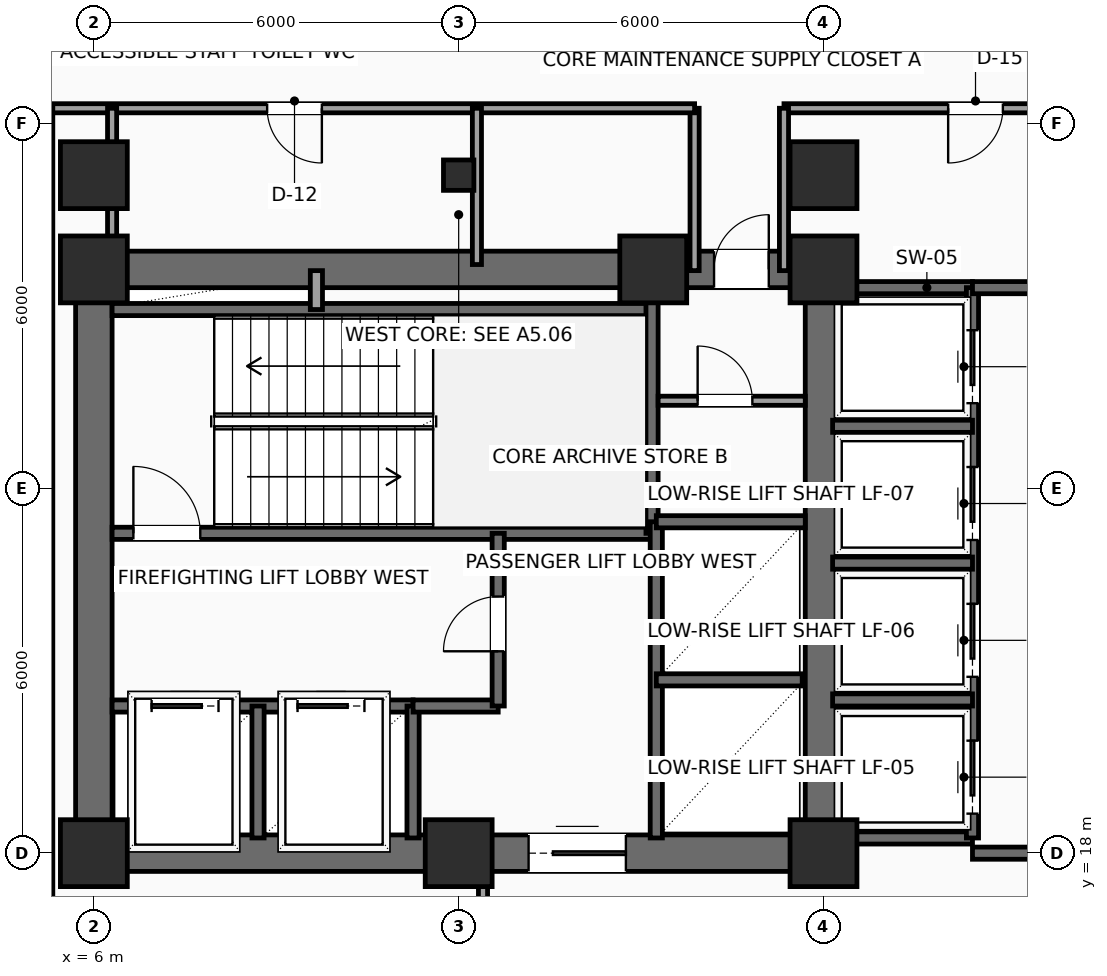
"""IFC4 building model, lengths in metres.
Left out: names, types, materials, properties, quantities, classifications, styles, units other than length and angle.
Written with IfcOpenShell. Run it as: python <this file> out.ifc"""

import sys

from ifc_helpers import new_model, si_unit, direction, frame, frame_2d, origin, origin_2d, place, context, subcontext, project, spatial, rectangle, hollow_rectangle, extrude, element, fill, save


model = new_model("IFC4")
c1 = context("Model", 3, precision=1e-05, world=origin(), true_north=direction((0.0, 1.0)))
c2 = subcontext(c1, "Body", "Model", "MODEL_VIEW")
j1 = project(units=[si_unit("LENGTHUNIT", "METRE"), si_unit("PLANEANGLEUNIT", "RADIAN")], contexts=[c1])
p1 = place(None, origin())
s1 = spatial("IfcSite", under=j1, at=p1, CompositionType="ELEMENT")
p2 = place(p1, origin())
s2 = spatial("IfcBuilding", under=s1, at=p2, CompositionType="ELEMENT")
p3 = place(p2, frame((0.0, 0.0, 99.6)))
s3 = spatial("IfcBuildingStorey", under=s2, at=p3, CompositionType="ELEMENT", Elevation=99.6)
for number, where, z_axis, x_axis in (
    (1, (6.0, 18.0, 0.0), (0.0, 0.0, 1.0), (1.0, 0.0, 0.0)),
    (2, (12.0, 18.0, 0.0), (0.0, 0.0, 1.0), (1.0, 0.0, 0.0)),
    (3, (18.0, 18.0, 0.0), (0.0, 0.0, 1.0), (1.0, 0.0, 0.0)),
    (4, (6.0, 27.6, 0.0), (0.0, 0.0, 1.0), (1.0, 0.0, 0.0)),
    (5, (15.2, 27.6, 0.0), (0.0, 0.0, 1.0), (1.0, 0.0, 0.0)),
    (6, (18.0, 27.6, 0.0), (0.0, 0.0, 1.0), (1.0, 0.0, 0.0)),
    (7, (6.0, 29.15, 0.0), (0.0, 0.0, 1.0), (1.0, 0.0, 0.0)),
):
    element("IfcColumn", number, at=place(p3, frame(where, z_axis=z_axis, x_axis=x_axis)), inside=s3, PredefinedType="COLUMN", context=c2, shape_type="SweptSolid", body=[
        extrude(rectangle(XDim=1.1, YDim=1.1, at=origin_2d()), origin(), (0.0, 0.0, 1.0), 3.75),
    ])
p4 = place(p3, frame((12.0, 29.15, 0.0), z_axis=(0.0, 0.0, 1.0), x_axis=(1.0, 0.0, 0.0)))
e8 = element("IfcColumn", 8, at=p4, inside=s3, PredefinedType="COLUMN", context=c2, shape_type="SweptSolid", body=[
    extrude(hollow_rectangle(XDim=0.5, YDim=0.5, WallThickness=0.025, InnerFilletRadius=0.025, OuterFilletRadius=0.04, at=origin_2d()), origin(), (0.0, 0.0, 1.0), 3.75),
])
p5 = place(p3, frame((18.0, 29.15, 0.0), z_axis=(0.0, 0.0, 1.0), x_axis=(1.0, 0.0, 0.0)))
e9 = element("IfcColumn", 9, at=p5, inside=s3, PredefinedType="COLUMN", context=c2, shape_type="SweptSolid", body=[
    extrude(rectangle(XDim=1.1, YDim=1.1, at=origin_2d()), origin(), (0.0, 0.0, 1.0), 3.75),
])
p6 = place(p3, frame((6.0, 18.0, 0.0), z_axis=(0.0, 0.0, 1.0), x_axis=(1.0, 0.0, 0.0)))
e10 = element("IfcWall", 10, at=p6, inside=s3, PredefinedType="SHEAR", context=c2, shape_type="SweptSolid", body=[
    extrude(rectangle(XDim=12.0, YDim=0.6, at=frame_2d((6.0, 0.0))), origin(), (0.0, 0.0, 1.0), 3.525),
])
p7 = place(p6, frame((7.15, 0.0, 0.0)))
e11 = element("IfcOpeningElement", 11, at=p7, cuts=e10, PredefinedType="OPENING", context=c2, shape_type="SweptSolid", body=[
    extrude(rectangle(XDim=1.6, YDim=2.3, at=frame_2d((0.8, 1.15))), frame((0.0, 0.31, 0.0), z_axis=(0.0, -1.0, 0.0), x_axis=(1.0, 0.0, 0.0)), (0.0, 0.0, 1.0), 0.62),
])
p8 = place(p3, frame((6.0, 27.6, 0.0), z_axis=(0.0, 0.0, 1.0), x_axis=(1.0, 0.0, 0.0)))
e12 = element("IfcWall", 12, at=p8, inside=s3, PredefinedType="SHEAR", context=c2, shape_type="SweptSolid", body=[
    extrude(rectangle(XDim=12.0, YDim=0.6, at=frame_2d((6.0, 0.0))), origin(), (0.0, 0.0, 1.0), 3.525),
])
p9 = place(p8, frame((10.2, 0.0, 0.0)))
e13 = element("IfcOpeningElement", 13, at=p9, cuts=e12, PredefinedType="OPENING", context=c2, shape_type="SweptSolid", body=[
    extrude(rectangle(XDim=0.9, YDim=2.15, at=frame_2d((0.45, 1.075))), frame((0.0, 0.31, 0.0), z_axis=(0.0, -1.0, 0.0), x_axis=(1.0, 0.0, 0.0)), (0.0, 0.0, 1.0), 0.62),
])
for number, where, z_axis, x_axis in (
    (14, (6.0, 18.0, 0.0), (0.0, 0.0, 1.0), (0.0, 1.0, 0.0)),
    (15, (18.0, 18.0, 0.0), (0.0, 0.0, 1.0), (0.0, 1.0, 0.0)),
):
    element("IfcWall", number, at=place(p3, frame(where, z_axis=z_axis, x_axis=x_axis)), inside=s3, PredefinedType="SHEAR", context=c2, shape_type="SweptSolid", body=[
        extrude(rectangle(XDim=9.6, YDim=0.6, at=frame_2d((4.8, 0.0))), origin(), (0.0, 0.0, 1.0), 3.525),
    ])
p10 = place(p3, frame((6.3, 23.26, 0.0), z_axis=(0.0, 0.0, 1.0), x_axis=(1.0, 0.0, 0.0)))
e16 = element("IfcWall", 16, at=p10, inside=s3, PredefinedType="SHEAR", context=c2, shape_type="SweptSolid", body=[
    extrude(rectangle(XDim=8.88, YDim=0.2, at=frame_2d((4.44, 0.0))), origin(), (0.0, 0.0, 1.0), 3.525),
])
p11 = place(p10, frame((0.35, 0.0, 0.0)))
e17 = element("IfcOpeningElement", 17, at=p11, cuts=e16, PredefinedType="OPENING", context=c2, shape_type="SweptSolid", body=[
    extrude(rectangle(XDim=1.1, YDim=2.2, at=frame_2d((0.55, 1.1))), frame((0.0, 0.11, 0.0), z_axis=(0.0, -1.0, 0.0), x_axis=(1.0, 0.0, 0.0)), (0.0, 0.0, 1.0), 0.22),
])
p12 = place(p3, frame((6.3, 26.94, 0.0), z_axis=(0.0, 0.0, 1.0), x_axis=(1.0, 0.0, 0.0)))
e18 = element("IfcWall", 18, at=p12, inside=s3, PredefinedType="SHEAR", context=c2, shape_type="SweptSolid", body=[
    extrude(rectangle(XDim=8.88, YDim=0.2, at=frame_2d((4.44, 0.0))), origin(), (0.0, 0.0, 1.0), 3.525),
])
p13 = place(p3, frame((15.18, 23.26, 0.0), z_axis=(0.0, 0.0, 1.0), x_axis=(0.0, 1.0, 0.0)))
e19 = element("IfcWall", 19, at=p13, inside=s3, PredefinedType="SHEAR", context=c2, shape_type="SweptSolid", body=[
    extrude(rectangle(XDim=4.04, YDim=0.2, at=frame_2d((2.02, 0.0))), origin(), (0.0, 0.0, 1.0), 3.525),
])
p14 = place(p3, frame((6.3, 20.42, 0.0), z_axis=(0.0, 0.0, 1.0), x_axis=(1.0, 0.0, 0.0)))
e20 = element("IfcWall", 20, at=p14, inside=s3, PredefinedType="SHEAR", context=c2, shape_type="SweptSolid", body=[
    extrude(rectangle(XDim=4.95, YDim=0.2, at=frame_2d((2.475, 0.0))), origin(), (0.0, 0.0, 1.0), 3.525),
])
p15 = place(p14, frame((0.65, 0.0, 0.0)))
e21 = element("IfcOpeningElement", 21, at=p15, cuts=e20, PredefinedType="OPENING", context=c2, shape_type="SweptSolid", body=[
    extrude(rectangle(XDim=1.1, YDim=2.2, at=frame_2d((0.55, 1.1))), frame((0.0, 0.11, 0.0), z_axis=(0.0, -1.0, 0.0), x_axis=(1.0, 0.0, 0.0)), (0.0, 0.0, 1.0), 0.22),
])
p16 = place(p14, frame((3.05, 0.0, 0.0)))
e22 = element("IfcOpeningElement", 22, at=p16, cuts=e20, PredefinedType="OPENING", context=c2, shape_type="SweptSolid", body=[
    extrude(rectangle(XDim=1.1, YDim=2.2, at=frame_2d((0.55, 1.1))), frame((0.0, 0.11, 0.0), z_axis=(0.0, -1.0, 0.0), x_axis=(1.0, 0.0, 0.0)), (0.0, 0.0, 1.0), 0.22),
])
for number, where, z_axis, x_axis in (
    (23, (8.7, 18.25, 0.0), (0.0, 0.0, 1.0), (0.0, 1.0, 0.0)),
    (24, (11.25, 18.25, 0.0), (0.0, 0.0, 1.0), (0.0, 1.0, 0.0)),
):
    element("IfcWall", number, at=place(p3, frame(where, z_axis=z_axis, x_axis=x_axis)), inside=s3, PredefinedType="SHEAR", context=c2, shape_type="SweptSolid", body=[
        extrude(rectangle(XDim=2.17, YDim=0.2, at=frame_2d((1.085, 0.0))), origin(), (0.0, 0.0, 1.0), 3.525),
    ])
p17 = place(p3, frame((11.25, 20.42, 0.0), z_axis=(0.0, 0.0, 1.0), x_axis=(1.0, 0.0, 0.0)))
e25 = element("IfcWall", 25, at=p17, inside=s3, PredefinedType="SHEAR", context=c2, shape_type="SweptSolid", body=[
    extrude(rectangle(XDim=1.4, YDim=0.2, at=frame_2d((0.7, 0.0))), origin(), (0.0, 0.0, 1.0), 3.525),
])
p18 = place(p3, frame((12.65, 20.42, 0.0), z_axis=(0.0, 0.0, 1.0), x_axis=(0.0, 1.0, 0.0)))
e26 = element("IfcWall", 26, at=p18, inside=s3, PredefinedType="SHEAR", context=c2, shape_type="SweptSolid", body=[
    extrude(rectangle(XDim=2.84, YDim=0.2, at=frame_2d((1.42, 0.0))), origin(), (0.0, 0.0, 1.0), 3.525),
])
p19 = place(p18, frame((0.9, 0.0, 0.0)))
e27 = element("IfcOpeningElement", 27, at=p19, cuts=e26, PredefinedType="OPENING", context=c2, shape_type="SweptSolid", body=[
    extrude(rectangle(XDim=0.9, YDim=2.15, at=frame_2d((0.45, 1.075))), frame((0.0, 0.11, 0.0), z_axis=(0.0, -1.0, 0.0), x_axis=(1.0, 0.0, 0.0)), (0.0, 0.0, 1.0), 0.22),
])
p20 = place(p3, frame((9.66, 26.94, 0.0), z_axis=(0.0, 0.0, 1.0), x_axis=(0.0, 1.0, 0.0)))
e28 = element("IfcWall", 28, at=p20, inside=s3, PredefinedType="SOLIDWALL", context=c2, shape_type="SweptSolid", body=[
    extrude(rectangle(XDim=0.64, YDim=0.2, at=frame_2d((0.32, 0.0))), origin(), (0.0, 0.0, 1.0), 3.525),
])
p21 = place(p3, frame((15.25, 18.25, 0.0), z_axis=(0.0, 0.0, 1.0), x_axis=(0.0, 1.0, 0.0)))
e29 = element("IfcWall", 29, at=p21, inside=s3, PredefinedType="SHEAR", context=c2, shape_type="SweptSolid", body=[
    extrude(rectangle(XDim=5.2, YDim=0.2, at=frame_2d((2.6, 0.0))), origin(), (0.0, 0.0, 1.0), 3.525),
])
p22 = place(p3, frame((15.25, 20.85, 0.0), z_axis=(0.0, 0.0, 1.0), x_axis=(1.0, 0.0, 0.0)))
e30 = element("IfcWall", 30, at=p22, inside=s3, PredefinedType="SHEAR", context=c2, shape_type="SweptSolid", body=[
    extrude(rectangle(XDim=2.4, YDim=0.2, at=frame_2d((1.2, 0.0))), origin(), (0.0, 0.0, 1.0), 3.525),
])
p23 = place(p3, frame((15.25, 23.45, 0.0), z_axis=(0.0, 0.0, 1.0), x_axis=(1.0, 0.0, 0.0)))
e31 = element("IfcWall", 31, at=p23, inside=s3, PredefinedType="SHEAR", context=c2, shape_type="SweptSolid", body=[
    extrude(rectangle(XDim=2.45, YDim=0.2, at=frame_2d((1.225, 0.0))), origin(), (0.0, 0.0, 1.0), 3.525),
])
p24 = place(p3, frame((15.28, 25.44, 0.0), z_axis=(0.0, 0.0, 1.0), x_axis=(1.0, 0.0, 0.0)))
e32 = element("IfcWall", 32, at=p24, inside=s3, PredefinedType="PARTITIONING", context=c2, shape_type="SweptSolid", body=[
    extrude(rectangle(XDim=2.42, YDim=0.15, at=frame_2d((1.21, 0.0))), origin(), (0.0, 0.0, 1.0), 3.525),
])
p25 = place(p24, frame((0.65, 0.0, 0.0)))
e33 = element("IfcOpeningElement", 33, at=p25, cuts=e32, PredefinedType="OPENING", context=c2, shape_type="SweptSolid", body=[
    extrude(rectangle(XDim=0.9, YDim=2.15, at=frame_2d((0.45, 1.075))), frame((0.0, 0.085, 0.0), z_axis=(0.0, -1.0, 0.0), x_axis=(1.0, 0.0, 0.0)), (0.0, 0.0, 1.0), 0.17),
])
for number, where, z_axis, x_axis in (
    (34, (18.1, 27.3, 0.0), (0.0, 0.0, 1.0), (1.0, 0.0, 0.0)),
    (35, (18.1, 18.25, 0.0), (0.0, 0.0, 1.0), (1.0, 0.0, 0.0)),
):
    element("IfcWall", number, at=place(p3, frame(where, z_axis=z_axis, x_axis=x_axis)), inside=s3, PredefinedType="SHEAR", context=c2, shape_type="SweptSolid", body=[
        extrude(rectangle(XDim=2.35, YDim=0.2, at=frame_2d((1.175, 0.0))), origin(), (0.0, 0.0, 1.0), 3.525),
    ])
p26 = place(p3, frame((20.45, 18.25, 0.0), z_axis=(0.0, 0.0, 1.0), x_axis=(0.0, 1.0, 0.0)))
e36 = element("IfcWall", 36, at=p26, inside=s3, PredefinedType="SHEAR", context=c2, shape_type="SweptSolid", body=[
    extrude(rectangle(XDim=9.05, YDim=0.2, at=frame_2d((4.525, 0.0))), origin(), (0.0, 0.0, 1.0), 3.525),
])
p27 = place(p26, frame((0.4, 0.0, 0.0)))
e37 = element("IfcOpeningElement", 37, at=p27, cuts=e36, PredefinedType="OPENING", context=c2, shape_type="SweptSolid", body=[
    extrude(rectangle(XDim=1.2, YDim=2.2, at=frame_2d((0.6, 1.1))), frame((0.0, 0.11, 0.0), z_axis=(0.0, -1.0, 0.0), x_axis=(1.0, 0.0, 0.0)), (0.0, 0.0, 1.0), 0.22),
])
p28 = place(p26, frame((2.65, 0.0, 0.0)))
e38 = element("IfcOpeningElement", 38, at=p28, cuts=e36, PredefinedType="OPENING", context=c2, shape_type="SweptSolid", body=[
    extrude(rectangle(XDim=1.2, YDim=2.2, at=frame_2d((0.6, 1.1))), frame((0.0, 0.11, 0.0), z_axis=(0.0, -1.0, 0.0), x_axis=(1.0, 0.0, 0.0)), (0.0, 0.0, 1.0), 0.22),
])
p29 = place(p26, frame((4.9, 0.0, 0.0)))
e39 = element("IfcOpeningElement", 39, at=p29, cuts=e36, PredefinedType="OPENING", context=c2, shape_type="SweptSolid", body=[
    extrude(rectangle(XDim=1.2, YDim=2.2, at=frame_2d((0.6, 1.1))), frame((0.0, 0.11, 0.0), z_axis=(0.0, -1.0, 0.0), x_axis=(1.0, 0.0, 0.0)), (0.0, 0.0, 1.0), 0.22),
])
p30 = place(p26, frame((7.15, 0.0, 0.0)))
e40 = element("IfcOpeningElement", 40, at=p30, cuts=e36, PredefinedType="OPENING", context=c2, shape_type="SweptSolid", body=[
    extrude(rectangle(XDim=1.2, YDim=2.2, at=frame_2d((0.6, 1.1))), frame((0.0, 0.11, 0.0), z_axis=(0.0, -1.0, 0.0), x_axis=(1.0, 0.0, 0.0)), (0.0, 0.0, 1.0), 0.22),
])
for number, where, z_axis, x_axis in (
    (41, (18.15, 20.52, 0.0), (0.0, 0.0, 1.0), (1.0, 0.0, 0.0)),
    (42, (18.15, 22.77, 0.0), (0.0, 0.0, 1.0), (1.0, 0.0, 0.0)),
    (43, (18.15, 25.02, 0.0), (0.0, 0.0, 1.0), (1.0, 0.0, 0.0)),
):
    element("IfcWall", number, at=place(p3, frame(where, z_axis=z_axis, x_axis=x_axis)), inside=s3, PredefinedType="SHEAR", context=c2, shape_type="SweptSolid", body=[
        extrude(rectangle(XDim=2.3, YDim=0.2, at=frame_2d((1.15, 0.0))), origin(), (0.0, 0.0, 1.0), 3.525),
    ])
p31 = place(p3, frame((20.45, 18.0, 0.0), z_axis=(0.0, 0.0, 1.0), x_axis=(1.0, 0.0, 0.0)))
e44 = element("IfcWall", 44, at=p31, inside=s3, PredefinedType="SHEAR", context=c2, shape_type="SweptSolid", body=[
    extrude(rectangle(XDim=3.5, YDim=0.2, at=frame_2d((1.75, 0.0))), origin(), (0.0, 0.0, 1.0), 3.525),
])
p32 = place(p31, frame((0.95, 0.0, 0.0)))
e45 = element("IfcOpeningElement", 45, at=p32, cuts=e44, PredefinedType="OPENING", context=c2, shape_type="SweptSolid", body=[
    extrude(rectangle(XDim=1.6, YDim=2.3, at=frame_2d((0.8, 1.15))), frame((0.0, 0.11, 0.0), z_axis=(0.0, -1.0, 0.0), x_axis=(1.0, 0.0, 0.0)), (0.0, 0.0, 1.0), 0.22),
])
p33 = place(p3, frame((20.45, 27.3, 0.0), z_axis=(0.0, 0.0, 1.0), x_axis=(1.0, 0.0, 0.0)))
e46 = element("IfcWall", 46, at=p33, inside=s3, PredefinedType="SHEAR", context=c2, shape_type="SweptSolid", body=[
    extrude(rectangle(XDim=3.5, YDim=0.2, at=frame_2d((1.75, 0.0))), origin(), (0.0, 0.0, 1.0), 3.525),
])
p34 = place(p3, frame((23.7, 30.25, 0.0), z_axis=(0.0, 0.0, 1.0), x_axis=(-1.0, 0.0, 0.0)))
e47 = element("IfcWall", 47, at=p34, inside=s3, PredefinedType="PARTITIONING", context=c2, shape_type="SweptSolid", body=[
    extrude(rectangle(XDim=6.35, YDim=0.15, at=frame_2d((3.175, 0.0))), origin(), (0.0, 0.0, 1.0), 3.525),
])
p35 = place(p34, frame((2.75, 0.0, 0.0)))
e48 = element("IfcOpeningElement", 48, at=p35, cuts=e47, PredefinedType="OPENING", context=c2, shape_type="SweptSolid", body=[
    extrude(rectangle(XDim=0.9, YDim=2.1, at=frame_2d((0.45, 1.05))), frame((0.0, 0.085, 0.0), z_axis=(0.0, -1.0, 0.0), x_axis=(1.0, 0.0, 0.0)), (0.0, 0.0, 1.0), 0.17),
])
for number, where, z_axis, x_axis in (
    (49, (17.35, 30.25, 0.0), (0.0, 0.0, 1.0), (0.0, -1.0, 0.0)),
    (50, (15.88, 27.58, 0.0), (0.0, 0.0, 1.0), (0.0, 1.0, 0.0)),
):
    element("IfcWall", number, at=place(p3, frame(where, z_axis=z_axis, x_axis=x_axis)), inside=s3, PredefinedType="PARTITIONING", context=c2, shape_type="SweptSolid", body=[
        extrude(rectangle(XDim=2.67, YDim=0.15, at=frame_2d((1.335, 0.0))), origin(), (0.0, 0.0, 1.0), 3.525),
    ])
p36 = place(p3, frame((15.88, 30.25, 0.0), z_axis=(0.0, 0.0, 1.0), x_axis=(-1.0, 0.0, 0.0)))
e51 = element("IfcWall", 51, at=p36, inside=s3, PredefinedType="PARTITIONING", context=c2, shape_type="SweptSolid", body=[
    extrude(rectangle(XDim=10.63, YDim=0.15, at=frame_2d((5.315, 0.0))), origin(), (0.0, 0.0, 1.0), 3.525),
])
p37 = place(p36, frame((6.13, 0.0, 0.0)))
e52 = element("IfcOpeningElement", 52, at=p37, cuts=e51, PredefinedType="OPENING", context=c2, shape_type="SweptSolid", body=[
    extrude(rectangle(XDim=0.9, YDim=2.1, at=frame_2d((0.45, 1.05))), frame((0.0, 0.085, 0.0), z_axis=(0.0, -1.0, 0.0), x_axis=(1.0, 0.0, 0.0)), (0.0, 0.0, 1.0), 0.17),
])
p38 = place(p3, frame((5.25, 30.25, 0.0), z_axis=(0.0, 0.0, 1.0), x_axis=(0.0, -1.0, 0.0)))
e53 = element("IfcWall", 53, at=p38, inside=s3, PredefinedType="PARTITIONING", context=c2, shape_type="SweptSolid", body=[
    extrude(rectangle(XDim=13.1, YDim=0.15, at=frame_2d((6.55, 0.0))), origin(), (0.0, 0.0, 1.0), 3.525),
])
p39 = place(p3, frame((12.4, 17.15, 0.0), z_axis=(0.0, 0.0, 1.0), x_axis=(0.0, 1.0, 0.0)))
e54 = element("IfcWall", 54, at=p39, inside=s3, PredefinedType="PARTITIONING", context=c2, shape_type="SweptSolid", body=[
    extrude(rectangle(XDim=0.8, YDim=0.15, at=frame_2d((0.4, 0.0))), origin(), (0.0, 0.0, 1.0), 3.525),
])
for number, where, z_axis, x_axis in (
    (55, (6.3, 27.68, 0.0), (0.0, 0.0, 1.0), (0.0, 1.0, 0.0)),
    (56, (12.3, 27.68, 0.0), (0.0, 0.0, 1.0), (0.0, 1.0, 0.0)),
):
    element("IfcWall", number, at=place(p3, frame(where, z_axis=z_axis, x_axis=x_axis)), inside=s3, PredefinedType="PARTITIONING", context=c2, shape_type="SweptSolid", body=[
        extrude(rectangle(XDim=2.57, YDim=0.15, at=frame_2d((1.285, 0.0))), origin(), (0.0, 0.0, 1.0), 3.017),
    ])
p40 = place(p7, origin())
e57 = element("IfcDoor", 57, at=p40, inside=s3, OperationType="DOUBLE_DOOR_SLIDING", PredefinedType="DOOR", context=c2, shape_type="SweptSolid", body=[
    extrude(rectangle(XDim=1.6, YDim=2.3, at=frame_2d((0.8, 1.15))), frame((0.0, 0.025, 0.0), z_axis=(0.0, -1.0, 0.0), x_axis=(1.0, 0.0, 0.0)), (0.0, 0.0, 1.0), 0.05),
])
fill(e11, e57)
p41 = place(p9, origin())
e58 = element("IfcDoor", 58, at=p41, inside=s3, OperationType="SINGLE_SWING_RIGHT", PredefinedType="DOOR", context=c2, shape_type="SweptSolid", body=[
    extrude(rectangle(XDim=0.9, YDim=2.15, at=frame_2d((0.45, 1.075))), frame((0.0, 0.025, 0.0), z_axis=(0.0, -1.0, 0.0), x_axis=(1.0, 0.0, 0.0)), (0.0, 0.0, 1.0), 0.05),
])
fill(e13, e58)
p42 = place(p11, origin())
e59 = element("IfcDoor", 59, at=p42, inside=s3, OperationType="SINGLE_SWING_LEFT", PredefinedType="DOOR", context=c2, shape_type="SweptSolid", body=[
    extrude(rectangle(XDim=1.1, YDim=2.2, at=frame_2d((0.55, 1.1))), frame((0.0, 0.025, 0.0), z_axis=(0.0, -1.0, 0.0), x_axis=(1.0, 0.0, 0.0)), (0.0, 0.0, 1.0), 0.05),
])
fill(e17, e59)
p43 = place(p15, origin())
e60 = element("IfcDoor", 60, at=p43, inside=s3, OperationType="SLIDING_TO_LEFT", PredefinedType="DOOR", context=c2, shape_type="SweptSolid", body=[
    extrude(rectangle(XDim=1.1, YDim=2.2, at=frame_2d((0.55, 1.1))), frame((0.0, 0.025, 0.0), z_axis=(0.0, -1.0, 0.0), x_axis=(1.0, 0.0, 0.0)), (0.0, 0.0, 1.0), 0.05),
])
fill(e21, e60)
p44 = place(p16, origin())
e61 = element("IfcDoor", 61, at=p44, inside=s3, OperationType="SLIDING_TO_LEFT", PredefinedType="DOOR", context=c2, shape_type="SweptSolid", body=[
    extrude(rectangle(XDim=1.1, YDim=2.2, at=frame_2d((0.55, 1.1))), frame((0.0, 0.025, 0.0), z_axis=(0.0, -1.0, 0.0), x_axis=(1.0, 0.0, 0.0)), (0.0, 0.0, 1.0), 0.05),
])
fill(e22, e61)
p45 = place(p19, origin())
e62 = element("IfcDoor", 62, at=p45, inside=s3, OperationType="SINGLE_SWING_LEFT", PredefinedType="DOOR", context=c2, shape_type="SweptSolid", body=[
    extrude(rectangle(XDim=0.9, YDim=2.15, at=frame_2d((0.45, 1.075))), frame((0.0, 0.025, 0.0), z_axis=(0.0, -1.0, 0.0), x_axis=(1.0, 0.0, 0.0)), (0.0, 0.0, 1.0), 0.05),
])
fill(e27, e62)
p46 = place(p25, origin())
e63 = element("IfcDoor", 63, at=p46, inside=s3, OperationType="SINGLE_SWING_LEFT", PredefinedType="DOOR", context=c2, shape_type="SweptSolid", body=[
    extrude(rectangle(XDim=0.9, YDim=2.15, at=frame_2d((0.45, 1.075))), frame((0.0, 0.025, 0.0), z_axis=(0.0, -1.0, 0.0), x_axis=(1.0, 0.0, 0.0)), (0.0, 0.0, 1.0), 0.05),
])
fill(e33, e63)
p47 = place(p27, origin())
e64 = element("IfcDoor", 64, at=p47, inside=s3, OperationType="SLIDING_TO_RIGHT", PredefinedType="DOOR", context=c2, shape_type="SweptSolid", body=[
    extrude(rectangle(XDim=1.2, YDim=2.2, at=frame_2d((0.6, 1.1))), frame((0.0, 0.025, 0.0), z_axis=(0.0, -1.0, 0.0), x_axis=(1.0, 0.0, 0.0)), (0.0, 0.0, 1.0), 0.05),
])
fill(e37, e64)
p48 = place(p28, origin())
e65 = element("IfcDoor", 65, at=p48, inside=s3, OperationType="SLIDING_TO_RIGHT", PredefinedType="DOOR", context=c2, shape_type="SweptSolid", body=[
    extrude(rectangle(XDim=1.2, YDim=2.2, at=frame_2d((0.6, 1.1))), frame((0.0, 0.025, 0.0), z_axis=(0.0, -1.0, 0.0), x_axis=(1.0, 0.0, 0.0)), (0.0, 0.0, 1.0), 0.05),
])
fill(e38, e65)
p49 = place(p29, origin())
e66 = element("IfcDoor", 66, at=p49, inside=s3, OperationType="SLIDING_TO_RIGHT", PredefinedType="DOOR", context=c2, shape_type="SweptSolid", body=[
    extrude(rectangle(XDim=1.2, YDim=2.2, at=frame_2d((0.6, 1.1))), frame((0.0, 0.025, 0.0), z_axis=(0.0, -1.0, 0.0), x_axis=(1.0, 0.0, 0.0)), (0.0, 0.0, 1.0), 0.05),
])
fill(e39, e66)
p50 = place(p30, origin())
e67 = element("IfcDoor", 67, at=p50, inside=s3, OperationType="SLIDING_TO_RIGHT", PredefinedType="DOOR", context=c2, shape_type="SweptSolid", body=[
    extrude(rectangle(XDim=1.2, YDim=2.2, at=frame_2d((0.6, 1.1))), frame((0.0, 0.025, 0.0), z_axis=(0.0, -1.0, 0.0), x_axis=(1.0, 0.0, 0.0)), (0.0, 0.0, 1.0), 0.05),
])
fill(e40, e67)
p51 = place(p35, origin())
e68 = element("IfcDoor", 68, at=p51, inside=s3, OperationType="SINGLE_SWING_RIGHT", PredefinedType="DOOR", context=c2, shape_type="SweptSolid", body=[
    extrude(rectangle(XDim=0.9, YDim=2.1, at=frame_2d((0.45, 1.05))), frame((0.0, 0.025, 0.0), z_axis=(0.0, -1.0, 0.0), x_axis=(1.0, 0.0, 0.0)), (0.0, 0.0, 1.0), 0.05),
])
fill(e48, e68)
p52 = place(p37, origin())
e69 = element("IfcDoor", 69, at=p52, inside=s3, OperationType="SINGLE_SWING_LEFT", PredefinedType="DOOR", context=c2, shape_type="SweptSolid", body=[
    extrude(rectangle(XDim=0.9, YDim=2.1, at=frame_2d((0.45, 1.05))), frame((0.0, 0.025, 0.0), z_axis=(0.0, -1.0, 0.0), x_axis=(1.0, 0.0, 0.0)), (0.0, 0.0, 1.0), 0.05),
])
fill(e52, e69)
save(model, sys.argv[1])
